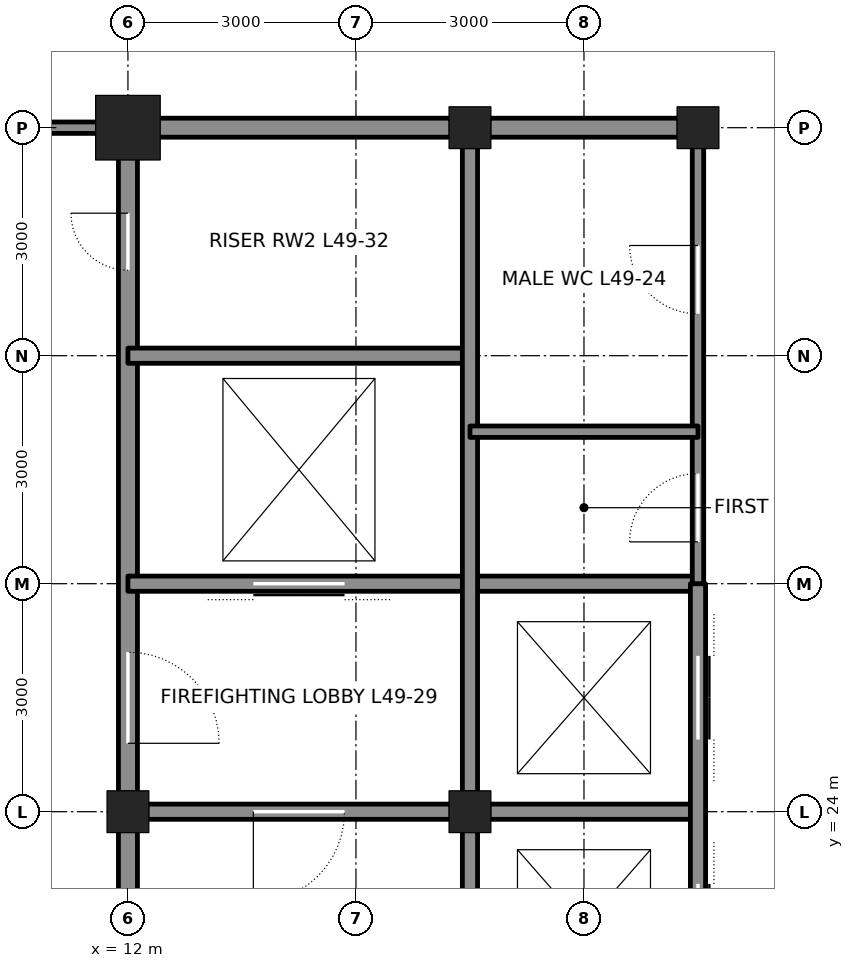
"""IFC4 building model, lengths in metres.
Left out: names, types, materials, properties, quantities, classifications, styles, units other than length and angle.
Written with IfcOpenShell. Run it as: python <this file> out.ifc"""

import sys

from ifc_helpers import new_model, si_unit, direction, frame, frame_2d, origin, origin_2d, place, context, subcontext, project, spatial, rectangle, hollow_rectangle, extrude, element, fill, save


model = new_model("IFC4")
c1 = context("Model", 3, precision=1e-05, world=origin(), true_north=direction((0.0, 1.0)))
c2 = subcontext(c1, "Body", "Model", "MODEL_VIEW")
j1 = project(units=[si_unit("LENGTHUNIT", "METRE"), si_unit("PLANEANGLEUNIT", "RADIAN")], contexts=[c1])
p1 = place(None, origin())
s1 = spatial("IfcSite", under=j1, at=p1, CompositionType="ELEMENT")
p2 = place(p1, origin())
s2 = spatial("IfcBuilding", under=s1, at=p2, CompositionType="ELEMENT")
p3 = place(p2, frame((0.0, 0.0, 222.3)))
s3 = spatial("IfcBuildingStorey", under=s2, at=p3, CompositionType="ELEMENT", Elevation=222.3)
p4 = place(p3, frame((12.0, 33.0, 0.0), z_axis=(0.0, 0.0, 1.0), x_axis=(1.0, 0.0, 0.0)))
e1 = element("IfcColumn", 1, at=p4, inside=s3, PredefinedType="COLUMN", context=c2, shape_type="SweptSolid", body=[
    extrude(hollow_rectangle(XDim=0.85, YDim=0.85, WallThickness=0.085, at=origin_2d()), origin(), (0.0, 0.0, 1.0), 4.2),
])
for number, where, z_axis, x_axis in (
    (2, (16.5, 33.0, 0.0), (0.0, 0.0, 1.0), (1.0, 0.0, 0.0)),
    (3, (19.5, 33.0, 0.0), (0.0, 0.0, 1.0), (1.0, 0.0, 0.0)),
    (4, (12.0, 24.0, 0.0), (0.0, 0.0, 1.0), (1.0, 0.0, 0.0)),
    (5, (16.5, 24.0, 0.0), (0.0, 0.0, 1.0), (1.0, 0.0, 0.0)),
):
    element("IfcColumn", number, at=place(p3, frame(where, z_axis=z_axis, x_axis=x_axis)), inside=s3, PredefinedType="COLUMN", context=c2, shape_type="SweptSolid", body=[
        extrude(hollow_rectangle(XDim=0.55, YDim=0.55, WallThickness=0.045, at=origin_2d()), origin(), (0.0, 0.0, 1.0), 4.2),
    ])
p5 = place(p3, frame((12.0, 21.25, 0.0), z_axis=(0.0, 0.0, 1.0), x_axis=(0.0, 1.0, 0.0)))
e6 = element("IfcWall", 6, at=p5, inside=s3, PredefinedType="SOLIDWALL", context=c2, shape_type="SweptSolid", body=[
    extrude(rectangle(XDim=2.5, YDim=0.25, at=frame_2d((1.25, 0.0))), origin(), (0.0, 0.0, 1.0), 3.113),
])
p6 = place(p3, frame((12.0, 24.25, 0.0), z_axis=(0.0, 0.0, 1.0), x_axis=(0.0, 1.0, 0.0)))
e7 = element("IfcWall", 7, at=p6, inside=s3, PredefinedType="SOLIDWALL", context=c2, shape_type="SweptSolid", body=[
    extrude(rectangle(XDim=8.5, YDim=0.25, at=frame_2d((4.25, 0.0))), origin(), (0.0, 0.0, 1.0), 3.113),
])
p7 = place(p6, frame((0.65, 0.0, 0.0)))
e8 = element("IfcOpeningElement", 8, at=p7, cuts=e7, PredefinedType="OPENING", context=c2, shape_type="SweptSolid", body=[
    extrude(rectangle(XDim=1.2, YDim=2.1, at=frame_2d((0.6, 1.05))), frame((0.0, 0.135, 0.0), z_axis=(0.0, -1.0, 0.0), x_axis=(1.0, 0.0, 0.0)), (0.0, 0.0, 1.0), 0.27),
])
p8 = place(p6, frame((6.875, 0.0, 0.0)))
e9 = element("IfcOpeningElement", 9, at=p8, cuts=e7, PredefinedType="OPENING", context=c2, shape_type="SweptSolid", body=[
    extrude(rectangle(XDim=0.75, YDim=2.1, at=frame_2d((0.375, 1.05))), frame((0.0, 0.135, 0.0), z_axis=(0.0, -1.0, 0.0), x_axis=(1.0, 0.0, 0.0)), (0.0, 0.0, 1.0), 0.27),
])
p9 = place(p3, frame((12.25, 24.0, 0.0), z_axis=(0.0, 0.0, 1.0), x_axis=(1.0, 0.0, 0.0)))
e10 = element("IfcWall", 10, at=p9, inside=s3, PredefinedType="SOLIDWALL", context=c2, shape_type="SweptSolid", body=[
    extrude(rectangle(XDim=4.0, YDim=0.2, at=frame_2d((2.0, 0.0))), origin(), (0.0, 0.0, 1.0), 3.09),
])
p10 = place(p9, frame((1.4, 0.0, 0.0)))
e11 = element("IfcOpeningElement", 11, at=p10, cuts=e10, PredefinedType="OPENING", context=c2, shape_type="SweptSolid", body=[
    extrude(rectangle(XDim=1.2, YDim=2.1, at=frame_2d((0.6, 1.05))), frame((0.0, 0.11, 0.0), z_axis=(0.0, -1.0, 0.0), x_axis=(1.0, 0.0, 0.0)), (0.0, 0.0, 1.0), 0.22),
])
p11 = place(p3, frame((16.75, 24.0, 0.0), z_axis=(0.0, 0.0, 1.0), x_axis=(1.0, 0.0, 0.0)))
e12 = element("IfcWall", 12, at=p11, inside=s3, PredefinedType="SOLIDWALL", context=c2, shape_type="SweptSolid", body=[
    extrude(rectangle(XDim=2.75, YDim=0.2, at=frame_2d((1.375, 0.0))), origin(), (0.0, 0.0, 1.0), 3.09),
])
p12 = place(p3, frame((12.0, 27.0, 0.0), z_axis=(0.0, 0.0, 1.0), x_axis=(1.0, 0.0, 0.0)))
e13 = element("IfcWall", 13, at=p12, inside=s3, PredefinedType="SOLIDWALL", context=c2, shape_type="SweptSolid", body=[
    extrude(rectangle(XDim=7.5, YDim=0.2, at=frame_2d((3.75, 0.0))), origin(), (0.0, 0.0, 1.0), 4.04),
])
p13 = place(p12, frame((1.65, 0.0, 0.0)))
e14 = element("IfcOpeningElement", 14, at=p13, cuts=e13, PredefinedType="OPENING", context=c2, shape_type="SweptSolid", body=[
    extrude(rectangle(XDim=1.2, YDim=2.1, at=frame_2d((0.6, 1.05))), frame((0.0, 0.11, 0.0), z_axis=(0.0, -1.0, 0.0), x_axis=(1.0, 0.0, 0.0)), (0.0, 0.0, 1.0), 0.22),
])
p14 = place(p3, frame((12.0, 30.0, 0.0), z_axis=(0.0, 0.0, 1.0), x_axis=(1.0, 0.0, 0.0)))
e15 = element("IfcWall", 15, at=p14, inside=s3, PredefinedType="SOLIDWALL", context=c2, shape_type="SweptSolid", body=[
    extrude(rectangle(XDim=4.5, YDim=0.2, at=frame_2d((2.25, 0.0))), origin(), (0.0, 0.0, 1.0), 4.04),
])
p15 = place(p3, frame((12.25, 33.0, 0.0), z_axis=(0.0, 0.0, 1.0), x_axis=(1.0, 0.0, 0.0)))
e16 = element("IfcWall", 16, at=p15, inside=s3, PredefinedType="SOLIDWALL", context=c2, shape_type="SweptSolid", body=[
    extrude(rectangle(XDim=4.0, YDim=0.25, at=frame_2d((2.0, 0.0))), origin(), (0.0, 0.0, 1.0), 3.181),
])
p16 = place(p3, frame((16.75, 33.0, 0.0), z_axis=(0.0, 0.0, 1.0), x_axis=(1.0, 0.0, 0.0)))
e17 = element("IfcWall", 17, at=p16, inside=s3, PredefinedType="SOLIDWALL", context=c2, shape_type="SweptSolid", body=[
    extrude(rectangle(XDim=2.5, YDim=0.25, at=frame_2d((1.25, 0.0))), origin(), (0.0, 0.0, 1.0), 3.181),
])
p17 = place(p3, frame((16.5, 21.25, 0.0), z_axis=(0.0, 0.0, 1.0), x_axis=(0.0, 1.0, 0.0)))
e18 = element("IfcWall", 18, at=p17, inside=s3, PredefinedType="SOLIDWALL", context=c2, shape_type="SweptSolid", body=[
    extrude(rectangle(XDim=2.5, YDim=0.2, at=frame_2d((1.25, 0.0))), origin(), (0.0, 0.0, 1.0), 3.113),
])
p18 = place(p3, frame((16.5, 24.25, 0.0), z_axis=(0.0, 0.0, 1.0), x_axis=(0.0, 1.0, 0.0)))
e19 = element("IfcWall", 19, at=p18, inside=s3, PredefinedType="SOLIDWALL", context=c2, shape_type="SweptSolid", body=[
    extrude(rectangle(XDim=8.5, YDim=0.2, at=frame_2d((4.25, 0.0))), origin(), (0.0, 0.0, 1.0), 3.113),
])
p19 = place(p3, frame((19.5, 15.0, 0.0), z_axis=(0.0, 0.0, 1.0), x_axis=(0.0, 1.0, 0.0)))
e20 = element("IfcWall", 20, at=p19, inside=s3, PredefinedType="SOLIDWALL", context=c2, shape_type="SweptSolid", body=[
    extrude(rectangle(XDim=12.0, YDim=0.2, at=frame_2d((6.0, 0.0))), origin(), (0.0, 0.0, 1.0), 3.064),
])
p20 = place(p19, frame((0.95, 0.0, 0.0)))
e21 = element("IfcOpeningElement", 21, at=p20, cuts=e20, PredefinedType="OPENING", context=c2, shape_type="SweptSolid", body=[
    extrude(rectangle(XDim=1.1, YDim=2.1, at=frame_2d((0.55, 1.05))), frame((0.0, 0.11, 0.0), z_axis=(0.0, -1.0, 0.0), x_axis=(1.0, 0.0, 0.0)), (0.0, 0.0, 1.0), 0.22),
])
p21 = place(p19, frame((3.95, 0.0, 0.0)))
e22 = element("IfcOpeningElement", 22, at=p21, cuts=e20, PredefinedType="OPENING", context=c2, shape_type="SweptSolid", body=[
    extrude(rectangle(XDim=1.1, YDim=2.1, at=frame_2d((0.55, 1.05))), frame((0.0, 0.11, 0.0), z_axis=(0.0, -1.0, 0.0), x_axis=(1.0, 0.0, 0.0)), (0.0, 0.0, 1.0), 0.22),
])
p22 = place(p19, frame((6.95, 0.0, 0.0)))
e23 = element("IfcOpeningElement", 23, at=p22, cuts=e20, PredefinedType="OPENING", context=c2, shape_type="SweptSolid", body=[
    extrude(rectangle(XDim=1.1, YDim=2.1, at=frame_2d((0.55, 1.05))), frame((0.0, 0.11, 0.0), z_axis=(0.0, -1.0, 0.0), x_axis=(1.0, 0.0, 0.0)), (0.0, 0.0, 1.0), 0.22),
])
p23 = place(p19, frame((9.95, 0.0, 0.0)))
e24 = element("IfcOpeningElement", 24, at=p23, cuts=e20, PredefinedType="OPENING", context=c2, shape_type="SweptSolid", body=[
    extrude(rectangle(XDim=1.1, YDim=2.1, at=frame_2d((0.55, 1.05))), frame((0.0, 0.11, 0.0), z_axis=(0.0, -1.0, 0.0), x_axis=(1.0, 0.0, 0.0)), (0.0, 0.0, 1.0), 0.22),
])
p24 = place(p3, frame((19.5, 27.0, 0.0), z_axis=(0.0, 0.0, 1.0), x_axis=(0.0, 1.0, 0.0)))
e25 = element("IfcWall", 25, at=p24, inside=s3, PredefinedType="PARTITIONING", context=c2, shape_type="SweptSolid", body=[
    extrude(rectangle(XDim=5.75, YDim=0.15, at=frame_2d((2.875, 0.0))), origin(), (0.0, 0.0, 1.0), 3.064),
])
p25 = place(p24, frame((0.55, 0.0, 0.0)))
e26 = element("IfcOpeningElement", 26, at=p25, cuts=e25, PredefinedType="OPENING", context=c2, shape_type="SweptSolid", body=[
    extrude(rectangle(XDim=0.9, YDim=2.1, at=frame_2d((0.45, 1.05))), frame((0.0, 0.085, 0.0), z_axis=(0.0, -1.0, 0.0), x_axis=(1.0, 0.0, 0.0)), (0.0, 0.0, 1.0), 0.17),
])
p26 = place(p24, frame((3.55, 0.0, 0.0)))
e27 = element("IfcOpeningElement", 27, at=p26, cuts=e25, PredefinedType="OPENING", context=c2, shape_type="SweptSolid", body=[
    extrude(rectangle(XDim=0.9, YDim=2.1, at=frame_2d((0.45, 1.05))), frame((0.0, 0.085, 0.0), z_axis=(0.0, -1.0, 0.0), x_axis=(1.0, 0.0, 0.0)), (0.0, 0.0, 1.0), 0.17),
])
p27 = place(p3, frame((16.5, 29.0, 0.0), z_axis=(0.0, 0.0, 1.0), x_axis=(1.0, 0.0, 0.0)))
e28 = element("IfcWall", 28, at=p27, inside=s3, PredefinedType="PARTITIONING", context=c2, shape_type="SweptSolid", body=[
    extrude(rectangle(XDim=3.0, YDim=0.15, at=frame_2d((1.5, 0.0))), origin(), (0.0, 0.0, 1.0), 4.04),
])
p28 = place(p3, frame((10.2, 33.0, 0.0), z_axis=(0.0, 0.0, 1.0), x_axis=(1.0, 0.0, 0.0)))
e29 = element("IfcWall", 29, at=p28, inside=s3, PredefinedType="PARTITIONING", context=c2, shape_type="SweptSolid", body=[
    extrude(rectangle(XDim=1.8, YDim=0.15, at=frame_2d((0.9, 0.0))), origin(), (0.0, 0.0, 1.0), 3.27),
])
p29 = place(p10, frame((1.2, 0.0, 0.0), z_axis=(0.0, 0.0, 1.0), x_axis=(-1.0, 0.0, 0.0)))
e30 = element("IfcDoor", 30, at=p29, inside=s3, OperationType="SINGLE_SWING_RIGHT", PredefinedType="DOOR", context=c2, shape_type="SweptSolid", body=[
    extrude(rectangle(XDim=1.2, YDim=2.1, at=frame_2d((0.6, 1.05))), frame((0.0, 0.025, 0.0), z_axis=(0.0, -1.0, 0.0), x_axis=(1.0, 0.0, 0.0)), (0.0, 0.0, 1.0), 0.05),
])
fill(e11, e30)
p30 = place(p7, frame((1.2, 0.0, 0.0), z_axis=(0.0, 0.0, 1.0), x_axis=(-1.0, 0.0, 0.0)))
e31 = element("IfcDoor", 31, at=p30, inside=s3, OperationType="SINGLE_SWING_RIGHT", PredefinedType="DOOR", context=c2, shape_type="SweptSolid", body=[
    extrude(rectangle(XDim=1.2, YDim=2.1, at=frame_2d((0.6, 1.05))), frame((0.0, 0.025, 0.0), z_axis=(0.0, -1.0, 0.0), x_axis=(1.0, 0.0, 0.0)), (0.0, 0.0, 1.0), 0.05),
])
fill(e8, e31)
p31 = place(p13, origin())
e32 = element("IfcDoor", 32, at=p31, inside=s3, OperationType="DOUBLE_DOOR_SLIDING", PredefinedType="DOOR", context=c2, shape_type="SweptSolid", body=[
    extrude(rectangle(XDim=1.2, YDim=2.1, at=frame_2d((0.6, 1.05))), frame((0.0, 0.025, 0.0), z_axis=(0.0, -1.0, 0.0), x_axis=(1.0, 0.0, 0.0)), (0.0, 0.0, 1.0), 0.05),
])
fill(e14, e32)
p32 = place(p8, origin())
e33 = element("IfcDoor", 33, at=p32, inside=s3, OperationType="SINGLE_SWING_RIGHT", PredefinedType="DOOR", context=c2, shape_type="SweptSolid", body=[
    extrude(rectangle(XDim=0.75, YDim=2.1, at=frame_2d((0.375, 1.05))), frame((0.0, 0.025, 0.0), z_axis=(0.0, -1.0, 0.0), x_axis=(1.0, 0.0, 0.0)), (0.0, 0.0, 1.0), 0.05),
])
fill(e9, e33)
p33 = place(p25, origin())
e34 = element("IfcDoor", 34, at=p33, inside=s3, OperationType="SINGLE_SWING_LEFT", PredefinedType="DOOR", context=c2, shape_type="SweptSolid", body=[
    extrude(rectangle(XDim=0.9, YDim=2.1, at=frame_2d((0.45, 1.05))), frame((0.0, 0.025, 0.0), z_axis=(0.0, -1.0, 0.0), x_axis=(1.0, 0.0, 0.0)), (0.0, 0.0, 1.0), 0.05),
])
fill(e26, e34)
p34 = place(p26, origin())
e35 = element("IfcDoor", 35, at=p34, inside=s3, OperationType="SINGLE_SWING_RIGHT", PredefinedType="DOOR", context=c2, shape_type="SweptSolid", body=[
    extrude(rectangle(XDim=0.9, YDim=2.1, at=frame_2d((0.45, 1.05))), frame((0.0, 0.025, 0.0), z_axis=(0.0, -1.0, 0.0), x_axis=(1.0, 0.0, 0.0)), (0.0, 0.0, 1.0), 0.05),
])
fill(e27, e35)
p35 = place(p22, origin())
e36 = element("IfcDoor", 36, at=p35, inside=s3, OperationType="DOUBLE_DOOR_SLIDING", PredefinedType="DOOR", context=c2, shape_type="SweptSolid", body=[
    extrude(rectangle(XDim=1.1, YDim=2.1, at=frame_2d((0.55, 1.05))), frame((0.0, 0.025, 0.0), z_axis=(0.0, -1.0, 0.0), x_axis=(1.0, 0.0, 0.0)), (0.0, 0.0, 1.0), 0.05),
])
fill(e23, e36)
p36 = place(p23, origin())
e37 = element("IfcDoor", 37, at=p36, inside=s3, OperationType="DOUBLE_DOOR_SLIDING", PredefinedType="DOOR", context=c2, shape_type="SweptSolid", body=[
    extrude(rectangle(XDim=1.1, YDim=2.1, at=frame_2d((0.55, 1.05))), frame((0.0, 0.025, 0.0), z_axis=(0.0, -1.0, 0.0), x_axis=(1.0, 0.0, 0.0)), (0.0, 0.0, 1.0), 0.05),
])
fill(e24, e37)
save(model, sys.argv[1])
